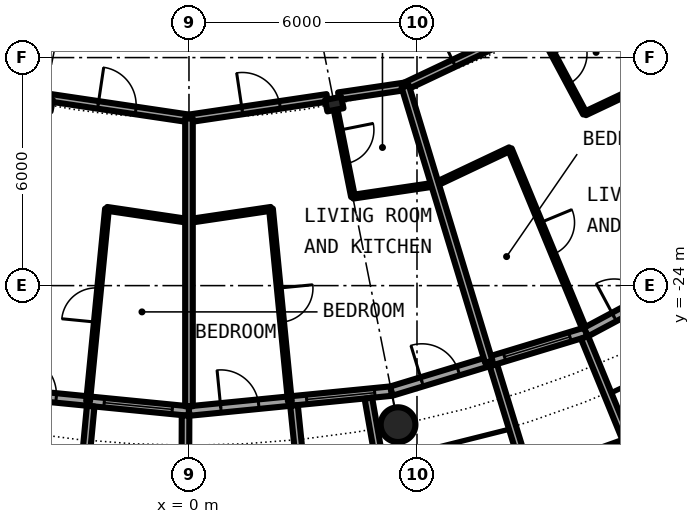
"""IFC4 building model, lengths in metres.
Left out: names, types, materials, properties, quantities, classifications, styles, units other than length and angle.
Written with IfcOpenShell. Run it as: python <this file> out.ifc"""

import sys

from ifc_helpers import new_model, si_unit, direction, frame, frame_2d, origin, origin_2d, place, context, subcontext, project, spatial, rectangle, circle, hollow_circle, i_section, extrude, element, fill, save


model = new_model("IFC4")
c1 = context("Model", 3, precision=1e-05, world=origin(), true_north=direction((0.0, 1.0)))
c2 = subcontext(c1, "Body", "Model", "MODEL_VIEW")
j1 = project(units=[si_unit("LENGTHUNIT", "METRE"), si_unit("PLANEANGLEUNIT", "RADIAN")], contexts=[c1])
p1 = place(None, origin())
s1 = spatial("IfcSite", under=j1, at=p1, CompositionType="ELEMENT")
p2 = place(p1, origin())
s2 = spatial("IfcBuilding", under=s1, at=p2, CompositionType="ELEMENT")
p3 = place(p2, frame((0.0, 0.0, 123.85)))
s3 = spatial("IfcBuildingStorey", under=s2, at=p3, CompositionType="ELEMENT", Elevation=123.85)
p4 = place(p3, frame((5.501, -27.658, 0.0), z_axis=(0.0, 0.0, 1.0), x_axis=(1.0, 0.0, 0.0)))
e1 = element("IfcColumn", 1, at=p4, inside=s3, PredefinedType="COLUMN", context=c2, shape_type="SweptSolid", body=[
    extrude(hollow_circle(Radius=0.457, WallThickness=0.04, at=origin_2d()), origin(), (0.0, 0.0, 1.0), 3.05),
])
for number, where, z_axis, x_axis in (
    (2, (-3.824, -19.223, 0.0), (0.0, 0.0, 1.0), (-0.195, -0.981, 0.0)),
    (3, (3.824, -19.223, 0.0), (0.0, 0.0, 1.0), (0.195, -0.981, 0.0)),
):
    element("IfcColumn", number, at=place(p3, frame(where, z_axis=z_axis, x_axis=x_axis)), inside=s3, PredefinedType="COLUMN", context=c2, shape_type="SweptSolid", body=[
        extrude(i_section(OverallWidth=0.307, OverallDepth=0.432, WebThickness=0.021, FlangeThickness=0.04, FilletRadius=0.027, at=origin_2d()), origin(), (0.0, 0.0, 1.0), 3.05),
    ])
p5 = place(p3, frame((-5.326, -26.775, 0.0), z_axis=(0.0, 0.0, 1.0), x_axis=(0.995173996315, -0.098126026407, 0.0)))
e4 = element("IfcWall", 4, at=p5, inside=s3, PredefinedType="SOLIDWALL", context=c2, shape_type="SweptSolid", body=[
    extrude(rectangle(XDim=5.352, YDim=0.25, at=frame_2d((2.676, 0.0))), origin(), (0.0, 0.0, 1.0), 2.7),
])
p6 = place(p5, frame((0.841, 0.0, 0.0)))
e5 = element("IfcOpeningElement", 5, at=p6, cuts=e4, PredefinedType="OPENING", context=c2, shape_type="SweptSolid", body=[
    extrude(rectangle(XDim=1.0, YDim=2.2, at=frame_2d((0.5, 1.1))), frame((0.0, 0.135, 0.0), z_axis=(0.0, -1.0, 0.0), x_axis=(1.0, 0.0, 0.0)), (0.0, 0.0, 1.0), 0.27),
])
p7 = place(p5, frame((3.111, 0.0, 0.3)))
e6 = element("IfcOpeningElement", 6, at=p7, cuts=e4, PredefinedType="OPENING", context=c2, shape_type="SweptSolid", body=[
    extrude(rectangle(XDim=1.8, YDim=2.1, at=frame_2d((0.9, 1.05))), frame((0.0, 0.135, 0.0), z_axis=(0.0, -1.0, 0.0), x_axis=(1.0, 0.0, 0.0)), (0.0, 0.0, 1.0), 0.27),
])
p8 = place(p3, frame((-2.586, -27.171, -0.03), z_axis=(0.0, 0.0, 1.0), x_axis=(-0.094548432284, -0.995520262954, 0.0)))
e7 = element("IfcWall", 7, at=p8, inside=s3, PredefinedType="SOLIDWALL", context=c2, shape_type="SweptSolid", body=[
    extrude(rectangle(XDim=3.006, YDim=0.2, at=frame_2d((1.503, 0.0))), origin(), (0.0, 0.0, 1.0), 2.73),
])
p9 = place(p3, frame((-0.09, -27.417, -0.03), z_axis=(0.0, 0.0, 1.0), x_axis=(-0.00347308367, -0.999993968827, 0.0)))
e8 = element("IfcWall", 8, at=p9, inside=s3, PredefinedType="SOLIDWALL", context=c2, shape_type="SweptSolid", body=[
    extrude(rectangle(XDim=2.882, YDim=0.2, at=frame_2d((1.441, 0.0))), origin(), (0.0, 0.0, 1.0), 2.73),
])
p10 = place(p3, frame((0.0, -27.3, 0.0), z_axis=(0.0, 0.0, 1.0), x_axis=(0.995173996315, 0.098126026407, 0.0)))
e9 = element("IfcWall", 9, at=p10, inside=s3, PredefinedType="SOLIDWALL", context=c2, shape_type="SweptSolid", body=[
    extrude(rectangle(XDim=5.352, YDim=0.25, at=frame_2d((2.676, 0.0))), origin(), (0.0, 0.0, 1.0), 2.7),
])
p11 = place(p10, frame((0.841, 0.0, 0.0)))
e10 = element("IfcOpeningElement", 10, at=p11, cuts=e9, PredefinedType="OPENING", context=c2, shape_type="SweptSolid", body=[
    extrude(rectangle(XDim=1.0, YDim=2.2, at=frame_2d((0.5, 1.1))), frame((0.0, 0.135, 0.0), z_axis=(0.0, -1.0, 0.0), x_axis=(1.0, 0.0, 0.0)), (0.0, 0.0, 1.0), 0.27),
])
p12 = place(p10, frame((3.111, 0.0, 0.3)))
e11 = element("IfcOpeningElement", 11, at=p12, cuts=e9, PredefinedType="OPENING", context=c2, shape_type="SweptSolid", body=[
    extrude(rectangle(XDim=1.8, YDim=2.1, at=frame_2d((0.9, 1.05))), frame((0.0, 0.135, 0.0), z_axis=(0.0, -1.0, 0.0), x_axis=(1.0, 0.0, 0.0)), (0.0, 0.0, 1.0), 0.27),
])
p13 = place(p3, frame((2.764, -27.153, -0.03), z_axis=(0.0, 0.0, 1.0), x_axis=(0.101505487237, -0.994834979311, 0.0)))
e12 = element("IfcWall", 12, at=p13, inside=s3, PredefinedType="SOLIDWALL", context=c2, shape_type="SweptSolid", body=[
    extrude(rectangle(XDim=3.007, YDim=0.2, at=frame_2d((1.503, 0.0))), origin(), (0.0, 0.0, 1.0), 2.73),
])
p14 = place(p3, frame((4.72, -26.961, -0.03), z_axis=(0.0, 0.0, 1.0), x_axis=(0.172463232037, -0.98501595601, 0.0)))
e13 = element("IfcWall", 13, at=p14, inside=s3, PredefinedType="SOLIDWALL", context=c2, shape_type="SweptSolid", body=[
    extrude(rectangle(XDim=2.929, YDim=0.2, at=frame_2d((1.464, 0.0))), origin(), (0.0, 0.0, 1.0), 2.73),
])
p15 = place(p3, frame((5.326, -26.775, 0.0), z_axis=(0.0, 0.0, 1.0), x_axis=(0.956965678721, 0.290201119486, 0.0)))
e14 = element("IfcWall", 14, at=p15, inside=s3, PredefinedType="SOLIDWALL", context=c2, shape_type="SweptSolid", body=[
    extrude(rectangle(XDim=5.351, YDim=0.25, at=frame_2d((2.676, 0.0))), origin(), (0.0, 0.0, 1.0), 2.7),
])
p16 = place(p15, frame((0.841, 0.0, 0.0)))
e15 = element("IfcOpeningElement", 15, at=p16, cuts=e14, PredefinedType="OPENING", context=c2, shape_type="SweptSolid", body=[
    extrude(rectangle(XDim=1.0, YDim=2.2, at=frame_2d((0.5, 1.1))), frame((0.0, 0.135, 0.0), z_axis=(0.0, -1.0, 0.0), x_axis=(1.0, 0.0, 0.0)), (0.0, 0.0, 1.0), 0.27),
])
p17 = place(p15, frame((3.111, 0.0, 0.3)))
e16 = element("IfcOpeningElement", 16, at=p17, cuts=e14, PredefinedType="OPENING", context=c2, shape_type="SweptSolid", body=[
    extrude(rectangle(XDim=1.8, YDim=2.1, at=frame_2d((0.9, 1.05))), frame((0.0, 0.135, 0.0), z_axis=(0.0, -1.0, 0.0), x_axis=(1.0, 0.0, 0.0)), (0.0, 0.0, 1.0), 0.27),
])
p18 = place(p3, frame((8.82, -29.093, -0.03), z_axis=(0.0, 0.0, 1.0), x_axis=(0.941461077774, 0.337121697664, 0.0)))
e17 = element("IfcWall", 17, at=p18, inside=s3, PredefinedType="SOLIDWALL", context=c2, shape_type="SweptSolid", body=[
    extrude(rectangle(XDim=2.993, YDim=0.2, at=frame_2d((1.497, 0.0))), origin(), (0.0, 0.0, 1.0), 2.73),
])
p19 = place(p18, frame((0.457, 0.0, 0.33)))
e18 = element("IfcOpeningElement", 18, at=p19, cuts=e17, PredefinedType="OPENING", context=c2, shape_type="SweptSolid", body=[
    extrude(circle(Radius=1.04, at=frame_2d((1.04, 1.04))), frame((0.0, 0.11, 0.0), z_axis=(0.0, -1.0, 0.0), x_axis=(1.0, 0.0, 0.0)), (0.0, 0.0, 1.0), 0.22),
])
p20 = place(p3, frame((8.009, -26.092, -0.03), z_axis=(0.0, 0.0, 1.0), x_axis=(0.293406695073, -0.955987715029, 0.0)))
e19 = element("IfcWall", 19, at=p20, inside=s3, PredefinedType="SOLIDWALL", context=c2, shape_type="SweptSolid", body=[
    extrude(rectangle(XDim=3.006, YDim=0.2, at=frame_2d((1.503, 0.0))), origin(), (0.0, 0.0, 1.0), 2.73),
])
p21 = place(p3, frame((10.409, -25.364, -0.03), z_axis=(0.0, 0.0, 1.0), x_axis=(0.379509886562, -0.925187681501, 0.0)))
e20 = element("IfcWall", 20, at=p21, inside=s3, PredefinedType="SOLIDWALL", context=c2, shape_type="SweptSolid", body=[
    extrude(rectangle(XDim=2.883, YDim=0.2, at=frame_2d((1.441, 0.0))), origin(), (0.0, 0.0, 1.0), 2.73),
])
p22 = place(p3, frame((10.447, -25.222, 0.0), z_axis=(0.0, 0.0, 1.0), x_axis=(0.881915646801, 0.471407246368, 0.0)))
e21 = element("IfcWall", 21, at=p22, inside=s3, PredefinedType="SOLIDWALL", context=c2, shape_type="SweptSolid", body=[
    extrude(rectangle(XDim=5.352, YDim=0.25, at=frame_2d((2.676, 0.0))), origin(), (0.0, 0.0, 1.0), 2.7),
])
p23 = place(p22, frame((0.841, 0.0, 0.0)))
e22 = element("IfcOpeningElement", 22, at=p23, cuts=e21, PredefinedType="OPENING", context=c2, shape_type="SweptSolid", body=[
    extrude(rectangle(XDim=1.0, YDim=2.2, at=frame_2d((0.5, 1.1))), frame((0.0, 0.135, 0.0), z_axis=(0.0, -1.0, 0.0), x_axis=(1.0, 0.0, 0.0)), (0.0, 0.0, 1.0), 0.27),
])
p24 = place(p22, frame((3.111, 0.0, 0.3)))
e23 = element("IfcOpeningElement", 23, at=p24, cuts=e21, PredefinedType="OPENING", context=c2, shape_type="SweptSolid", body=[
    extrude(rectangle(XDim=1.8, YDim=2.1, at=frame_2d((0.9, 1.05))), frame((0.0, 0.135, 0.0), z_axis=(0.0, -1.0, 0.0), x_axis=(1.0, 0.0, 0.0)), (0.0, 0.0, 1.0), 0.27),
])
for number, where, z_axis, x_axis in (
    (24, (-2.159, -21.98, 0.0), (0.0, 0.0, 1.0), (0.989, -0.147, 0.0)),
    (25, (0.002, -22.3, 0.0), (0.0, 0.0, 1.0), (0.989, 0.147, 0.0)),
    (26, (4.316, -21.66, 0.0), (0.0, 0.0, 1.0), (0.989, 0.147, 0.0)),
):
    element("IfcWall", number, at=place(p3, frame(where, z_axis=z_axis, x_axis=x_axis)), inside=s3, PredefinedType="PARTITIONING", context=c2, shape_type="SweptSolid", body=[
        extrude(rectangle(XDim=2.181, YDim=0.1, at=frame_2d((1.09, 0.0))), origin(), (0.0, 0.0, 1.0), 2.7),
    ])
p25 = place(p3, frame((6.473, -21.34, 0.0), z_axis=(0.0, 0.0, 1.0), x_axis=(0.903929143338, 0.427682246328, 0.0)))
e27 = element("IfcWall", 27, at=p25, inside=s3, PredefinedType="PARTITIONING", context=c2, shape_type="SweptSolid", body=[
    extrude(rectangle(XDim=2.182, YDim=0.1, at=frame_2d((1.091, 0.0))), origin(), (0.0, 0.0, 1.0), 2.7),
])
p26 = place(p3, frame((10.425, -19.47, 0.0), z_axis=(0.0, 0.0, 1.0), x_axis=(0.903951937529, 0.427634066274, 0.0)))
e28 = element("IfcWall", 28, at=p26, inside=s3, PredefinedType="PARTITIONING", context=c2, shape_type="SweptSolid", body=[
    extrude(rectangle(XDim=2.181, YDim=0.1, at=frame_2d((1.091, 0.0))), origin(), (0.0, 0.0, 1.0), 2.7),
])
p27 = place(p3, frame((-3.635, -19.06, 0.0), z_axis=(0.0, 0.0, 1.0), x_axis=(0.989143454832, -0.146953141385, 0.0)))
e29 = element("IfcWall", 29, at=p27, inside=s3, PredefinedType="PARTITIONING", context=c2, shape_type="SweptSolid", body=[
    extrude(rectangle(XDim=3.675, YDim=0.2, at=frame_2d((1.837, 0.0))), origin(), (0.0, 0.0, 1.0), 2.39),
])
p28 = place(p27, frame((1.258, 0.0, 0.0)))
e30 = element("IfcOpeningElement", 30, at=p28, cuts=e29, PredefinedType="OPENING", context=c2, shape_type="SweptSolid", body=[
    extrude(rectangle(XDim=1.0, YDim=2.3, at=frame_2d((0.5, 1.15))), frame((0.0, 0.11, 0.0), z_axis=(0.0, -1.0, 0.0), x_axis=(1.0, 0.0, 0.0)), (0.0, 0.0, 1.0), 0.22),
])
p29 = place(p3, frame((0.0, -19.6, 0.0), z_axis=(0.0, 0.0, 1.0), x_axis=(0.989143454832, 0.146953141385, 0.0)))
e31 = element("IfcWall", 31, at=p29, inside=s3, PredefinedType="PARTITIONING", context=c2, shape_type="SweptSolid", body=[
    extrude(rectangle(XDim=3.675, YDim=0.2, at=frame_2d((1.837, 0.0))), origin(), (0.0, 0.0, 1.0), 2.39),
])
p30 = place(p29, frame((1.417, 0.0, 0.0)))
e32 = element("IfcOpeningElement", 32, at=p30, cuts=e31, PredefinedType="OPENING", context=c2, shape_type="SweptSolid", body=[
    extrude(rectangle(XDim=1.0, YDim=2.3, at=frame_2d((0.5, 1.15))), frame((0.0, 0.11, 0.0), z_axis=(0.0, -1.0, 0.0), x_axis=(1.0, 0.0, 0.0)), (0.0, 0.0, 1.0), 0.22),
])
p31 = place(p3, frame((3.939, -19.015, 0.0), z_axis=(0.0, 0.0, 1.0), x_axis=(0.989227802256, 0.146384272531, 0.0)))
e33 = element("IfcWall", 33, at=p31, inside=s3, PredefinedType="PARTITIONING", context=c2, shape_type="SweptSolid", body=[
    extrude(rectangle(XDim=1.776, YDim=0.2, at=frame_2d((0.888, 0.0))), origin(), (0.0, 0.0, 1.0), 2.39),
])
p32 = place(p3, frame((5.69, -18.756, 0.0), z_axis=(0.0, 0.0, 1.0), x_axis=(0.903968655954, 0.427598724335, 0.0)))
e34 = element("IfcWall", 34, at=p32, inside=s3, PredefinedType="PARTITIONING", context=c2, shape_type="SweptSolid", body=[
    extrude(rectangle(XDim=5.596, YDim=0.2, at=frame_2d((2.798, 0.0))), origin(), (0.0, 0.0, 1.0), 2.39),
])
p33 = place(p32, frame((1.418, 0.0, 0.0)))
e35 = element("IfcOpeningElement", 35, at=p33, cuts=e34, PredefinedType="OPENING", context=c2, shape_type="SweptSolid", body=[
    extrude(rectangle(XDim=1.0, YDim=2.3, at=frame_2d((0.5, 1.15))), frame((0.0, 0.11, 0.0), z_axis=(0.0, -1.0, 0.0), x_axis=(1.0, 0.0, 0.0)), (0.0, 0.0, 1.0), 0.22),
])
p34 = place(p3, frame((-2.655, -27.045, 0.0), z_axis=(0.0, 0.0, 1.0), x_axis=(0.097670180016, 0.995218838214, 0.0)))
e36 = element("IfcWall", 36, at=p34, inside=s3, PredefinedType="PARTITIONING", context=c2, shape_type="SweptSolid", body=[
    extrude(rectangle(XDim=5.089, YDim=0.1, at=frame_2d((2.545, 0.0))), origin(), (0.0, 0.0, 1.0), 2.7),
])
p35 = place(p34, frame((2.095, 0.0, 0.0)))
e37 = element("IfcOpeningElement", 37, at=p35, cuts=e36, PredefinedType="OPENING", context=c2, shape_type="SweptSolid", body=[
    extrude(rectangle(XDim=0.9, YDim=2.3, at=frame_2d((0.45, 1.15))), frame((0.0, 0.06, 0.0), z_axis=(0.0, -1.0, 0.0), x_axis=(1.0, 0.0, 0.0)), (0.0, 0.0, 1.0), 0.12),
])
p36 = place(p3, frame((0.0, -27.175, 0.0), z_axis=(0.0, 0.0, 1.0), x_axis=(0.0, 1.0, 0.0)))
e38 = element("IfcWall", 38, at=p36, inside=s3, PredefinedType="PARTITIONING", context=c2, shape_type="SweptSolid", body=[
    extrude(rectangle(XDim=7.575, YDim=0.2, at=frame_2d((3.788, 0.0))), origin(), (0.0, 0.0, 1.0), 2.7),
])
p37 = place(p3, frame((2.158, -21.98, 0.0), z_axis=(0.0, 0.0, 1.0), x_axis=(0.097670180016, -0.995218838214, 0.0)))
e39 = element("IfcWall", 39, at=p37, inside=s3, PredefinedType="PARTITIONING", context=c2, shape_type="SweptSolid", body=[
    extrude(rectangle(XDim=5.089, YDim=0.1, at=frame_2d((2.545, 0.0))), origin(), (0.0, 0.0, 1.0), 2.7),
])
p38 = place(p37, frame((2.095, 0.0, 0.0)))
e40 = element("IfcOpeningElement", 40, at=p38, cuts=e39, PredefinedType="OPENING", context=c2, shape_type="SweptSolid", body=[
    extrude(rectangle(XDim=0.9, YDim=2.3, at=frame_2d((0.45, 1.15))), frame((0.0, 0.06, 0.0), z_axis=(0.0, -1.0, 0.0), x_axis=(1.0, 0.0, 0.0)), (0.0, 0.0, 1.0), 0.12),
])
p39 = place(p3, frame((3.872, -19.434, 0.0), z_axis=(0.0, 0.0, 1.0), x_axis=(0.195557580153, -0.980692221262, 0.0)))
e41 = element("IfcWall", 41, at=p39, inside=s3, PredefinedType="PARTITIONING", context=c2, shape_type="SweptSolid", body=[
    extrude(rectangle(XDim=2.27, YDim=0.1, at=frame_2d((1.135, 0.0))), origin(), (0.0, 0.0, 1.0), 2.7),
])
p40 = place(p39, frame((0.483, 0.0, 0.0)))
e42 = element("IfcOpeningElement", 42, at=p40, cuts=e41, PredefinedType="OPENING", context=c2, shape_type="SweptSolid", body=[
    extrude(rectangle(XDim=0.9, YDim=2.3, at=frame_2d((0.45, 1.15))), frame((0.0, 0.06, 0.0), z_axis=(0.0, -1.0, 0.0), x_axis=(1.0, 0.0, 0.0)), (0.0, 0.0, 1.0), 0.12),
])
p41 = place(p3, frame((5.69, -18.756, 0.0), z_axis=(0.0, 0.0, 1.0), x_axis=(0.290448401467, -0.95689065524, 0.0)))
e43 = element("IfcWall", 43, at=p41, inside=s3, PredefinedType="PARTITIONING", context=c2, shape_type="SweptSolid", body=[
    extrude(rectangle(XDim=7.574, YDim=0.2, at=frame_2d((3.787, 0.0))), origin(), (0.0, 0.0, 1.0), 2.7),
])
p42 = place(p3, frame((8.445, -20.407, 0.0), z_axis=(0.0, 0.0, 1.0), x_axis=(0.382339082848, -0.92402209158, 0.0)))
e44 = element("IfcWall", 44, at=p42, inside=s3, PredefinedType="PARTITIONING", context=c2, shape_type="SweptSolid", body=[
    extrude(rectangle(XDim=5.09, YDim=0.1, at=frame_2d((2.545, 0.0))), origin(), (0.0, 0.0, 1.0), 2.7),
])
p43 = place(p42, frame((2.095, 0.0, 0.0)))
e45 = element("IfcOpeningElement", 45, at=p43, cuts=e44, PredefinedType="OPENING", context=c2, shape_type="SweptSolid", body=[
    extrude(rectangle(XDim=0.9, YDim=2.3, at=frame_2d((0.45, 1.15))), frame((0.0, 0.06, 0.0), z_axis=(0.0, -1.0, 0.0), x_axis=(1.0, 0.0, 0.0)), (0.0, 0.0, 1.0), 0.12),
])
p44 = place(p3, frame((9.156, -17.117, 0.0), z_axis=(0.0, 0.0, 1.0), x_axis=(0.471701791767, -0.881758141241, 0.0)))
e46 = element("IfcWall", 46, at=p44, inside=s3, PredefinedType="PARTITIONING", context=c2, shape_type="SweptSolid", body=[
    extrude(rectangle(XDim=2.673, YDim=0.1, at=frame_2d((1.337, 0.0))), origin(), (0.0, 0.0, 1.0), 2.7),
])
p45 = place(p44, frame((0.887, 0.0, 0.0)))
e47 = element("IfcOpeningElement", 47, at=p45, cuts=e46, PredefinedType="OPENING", context=c2, shape_type="SweptSolid", body=[
    extrude(rectangle(XDim=0.9, YDim=2.3, at=frame_2d((0.45, 1.15))), frame((0.0, 0.06, 0.0), z_axis=(0.0, -1.0, 0.0), x_axis=(1.0, 0.0, 0.0)), (0.0, 0.0, 1.0), 0.12),
])
p46 = place(p3, frame((11.009, -16.477, 0.0), z_axis=(0.0, 0.0, 1.0), x_axis=(0.555664536482, -0.831406593008, 0.0)))
e48 = element("IfcWall", 48, at=p46, inside=s3, PredefinedType="PARTITIONING", context=c2, shape_type="SweptSolid", body=[
    extrude(rectangle(XDim=7.358, YDim=0.2, at=frame_2d((3.679, 0.0))), origin(), (0.0, 0.0, 1.0), 2.7),
])
p47 = place(p6, origin())
e49 = element("IfcDoor", 49, at=p47, inside=s3, OperationType="SINGLE_SWING_LEFT", PredefinedType="DOOR", context=c2, shape_type="SweptSolid", body=[
    extrude(rectangle(XDim=1.0, YDim=2.2, at=frame_2d((0.5, 1.1))), frame((0.0, 0.025, 0.0), z_axis=(0.0, -1.0, 0.0), x_axis=(1.0, 0.0, 0.0)), (0.0, 0.0, 1.0), 0.05),
])
fill(e5, e49)
p48 = place(p7, origin())
e50 = element("IfcWindow", 50, at=p48, inside=s3, PartitioningType="SINGLE_PANEL", PredefinedType="WINDOW", context=c2, shape_type="SweptSolid", body=[
    extrude(rectangle(XDim=1.8, YDim=2.1, at=frame_2d((0.9, 1.05))), frame((0.0, 0.03, 0.0), z_axis=(0.0, -1.0, 0.0), x_axis=(1.0, 0.0, 0.0)), (0.0, 0.0, 1.0), 0.06),
])
fill(e6, e50)
p49 = place(p11, origin())
e51 = element("IfcDoor", 51, at=p49, inside=s3, OperationType="SINGLE_SWING_LEFT", PredefinedType="DOOR", context=c2, shape_type="SweptSolid", body=[
    extrude(rectangle(XDim=1.0, YDim=2.2, at=frame_2d((0.5, 1.1))), frame((0.0, 0.025, 0.0), z_axis=(0.0, -1.0, 0.0), x_axis=(1.0, 0.0, 0.0)), (0.0, 0.0, 1.0), 0.05),
])
fill(e10, e51)
p50 = place(p12, origin())
e52 = element("IfcWindow", 52, at=p50, inside=s3, PartitioningType="SINGLE_PANEL", PredefinedType="WINDOW", context=c2, shape_type="SweptSolid", body=[
    extrude(rectangle(XDim=1.8, YDim=2.1, at=frame_2d((0.9, 1.05))), frame((0.0, 0.03, 0.0), z_axis=(0.0, -1.0, 0.0), x_axis=(1.0, 0.0, 0.0)), (0.0, 0.0, 1.0), 0.06),
])
fill(e11, e52)
p51 = place(p16, origin())
e53 = element("IfcDoor", 53, at=p51, inside=s3, OperationType="SINGLE_SWING_LEFT", PredefinedType="DOOR", context=c2, shape_type="SweptSolid", body=[
    extrude(rectangle(XDim=1.0, YDim=2.2, at=frame_2d((0.5, 1.1))), frame((0.0, 0.025, 0.0), z_axis=(0.0, -1.0, 0.0), x_axis=(1.0, 0.0, 0.0)), (0.0, 0.0, 1.0), 0.05),
])
fill(e15, e53)
p52 = place(p17, origin())
e54 = element("IfcWindow", 54, at=p52, inside=s3, PartitioningType="SINGLE_PANEL", PredefinedType="WINDOW", context=c2, shape_type="SweptSolid", body=[
    extrude(rectangle(XDim=1.8, YDim=2.1, at=frame_2d((0.9, 1.05))), frame((0.0, 0.03, 0.0), z_axis=(0.0, -1.0, 0.0), x_axis=(1.0, 0.0, 0.0)), (0.0, 0.0, 1.0), 0.06),
])
fill(e16, e54)
p53 = place(p23, origin())
e55 = element("IfcDoor", 55, at=p53, inside=s3, OperationType="SINGLE_SWING_LEFT", PredefinedType="DOOR", context=c2, shape_type="SweptSolid", body=[
    extrude(rectangle(XDim=1.0, YDim=2.2, at=frame_2d((0.5, 1.1))), frame((0.0, 0.025, 0.0), z_axis=(0.0, -1.0, 0.0), x_axis=(1.0, 0.0, 0.0)), (0.0, 0.0, 1.0), 0.05),
])
fill(e22, e55)
p54 = place(p28, origin())
e56 = element("IfcDoor", 56, at=p54, inside=s3, OperationType="SINGLE_SWING_LEFT", PredefinedType="DOOR", context=c2, shape_type="SweptSolid", body=[
    extrude(rectangle(XDim=1.0, YDim=2.3, at=frame_2d((0.5, 1.15))), frame((0.0, 0.025, 0.0), z_axis=(0.0, -1.0, 0.0), x_axis=(1.0, 0.0, 0.0)), (0.0, 0.0, 1.0), 0.05),
])
fill(e30, e56)
p55 = place(p35, origin())
e57 = element("IfcDoor", 57, at=p55, inside=s3, OperationType="SINGLE_SWING_RIGHT", PredefinedType="DOOR", context=c2, shape_type="SweptSolid", body=[
    extrude(rectangle(XDim=0.9, YDim=2.3, at=frame_2d((0.45, 1.15))), frame((0.0, 0.025, 0.0), z_axis=(0.0, -1.0, 0.0), x_axis=(1.0, 0.0, 0.0)), (0.0, 0.0, 1.0), 0.05),
])
fill(e37, e57)
p56 = place(p30, origin())
e58 = element("IfcDoor", 58, at=p56, inside=s3, OperationType="SINGLE_SWING_RIGHT", PredefinedType="DOOR", context=c2, shape_type="SweptSolid", body=[
    extrude(rectangle(XDim=1.0, YDim=2.3, at=frame_2d((0.5, 1.15))), frame((0.0, 0.025, 0.0), z_axis=(0.0, -1.0, 0.0), x_axis=(1.0, 0.0, 0.0)), (0.0, 0.0, 1.0), 0.05),
])
fill(e32, e58)
p57 = place(p40, origin())
e59 = element("IfcDoor", 59, at=p57, inside=s3, OperationType="SINGLE_SWING_LEFT", PredefinedType="DOOR", context=c2, shape_type="SweptSolid", body=[
    extrude(rectangle(XDim=0.9, YDim=2.3, at=frame_2d((0.45, 1.15))), frame((0.0, 0.025, 0.0), z_axis=(0.0, -1.0, 0.0), x_axis=(1.0, 0.0, 0.0)), (0.0, 0.0, 1.0), 0.05),
])
fill(e42, e59)
p58 = place(p38, origin())
e60 = element("IfcDoor", 60, at=p58, inside=s3, OperationType="SINGLE_SWING_LEFT", PredefinedType="DOOR", context=c2, shape_type="SweptSolid", body=[
    extrude(rectangle(XDim=0.9, YDim=2.3, at=frame_2d((0.45, 1.15))), frame((0.0, 0.025, 0.0), z_axis=(0.0, -1.0, 0.0), x_axis=(1.0, 0.0, 0.0)), (0.0, 0.0, 1.0), 0.05),
])
fill(e40, e60)
p59 = place(p33, origin())
e61 = element("IfcDoor", 61, at=p59, inside=s3, OperationType="SINGLE_SWING_LEFT", PredefinedType="DOOR", context=c2, shape_type="SweptSolid", body=[
    extrude(rectangle(XDim=1.0, YDim=2.3, at=frame_2d((0.5, 1.15))), frame((0.0, 0.025, 0.0), z_axis=(0.0, -1.0, 0.0), x_axis=(1.0, 0.0, 0.0)), (0.0, 0.0, 1.0), 0.05),
])
fill(e35, e61)
p60 = place(p45, origin())
e62 = element("IfcDoor", 62, at=p60, inside=s3, OperationType="SINGLE_SWING_LEFT", PredefinedType="DOOR", context=c2, shape_type="SweptSolid", body=[
    extrude(rectangle(XDim=0.9, YDim=2.3, at=frame_2d((0.45, 1.15))), frame((0.0, 0.025, 0.0), z_axis=(0.0, -1.0, 0.0), x_axis=(1.0, 0.0, 0.0)), (0.0, 0.0, 1.0), 0.05),
])
fill(e47, e62)
p61 = place(p43, origin())
e63 = element("IfcDoor", 63, at=p61, inside=s3, OperationType="SINGLE_SWING_LEFT", PredefinedType="DOOR", context=c2, shape_type="SweptSolid", body=[
    extrude(rectangle(XDim=0.9, YDim=2.3, at=frame_2d((0.45, 1.15))), frame((0.0, 0.025, 0.0), z_axis=(0.0, -1.0, 0.0), x_axis=(1.0, 0.0, 0.0)), (0.0, 0.0, 1.0), 0.05),
])
fill(e45, e63)
save(model, sys.argv[1])
